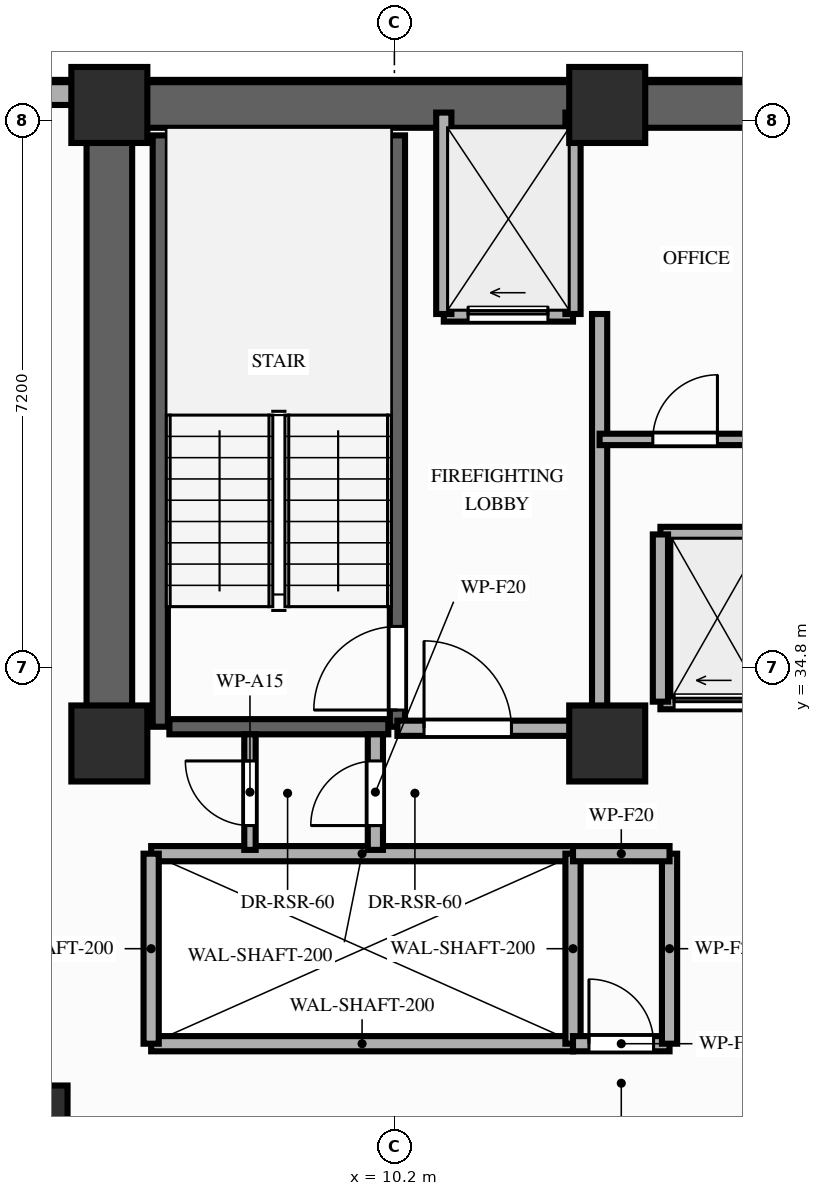
"""IFC4 building model, lengths in metres.
Left out: names, types, materials, properties, quantities, classifications, styles, units other than length and angle.
Written with IfcOpenShell. Run it as: python <this file> out.ifc"""

import sys

from ifc_helpers import new_model, si_unit, direction, frame, frame_2d, origin, origin_2d, place, context, subcontext, project, spatial, rectangle, extrude, element, fill, save


model = new_model("IFC4")
c1 = context("Model", 3, precision=1e-05, world=origin(), true_north=direction((0.0, 1.0)))
c2 = subcontext(c1, "Body", "Model", "MODEL_VIEW")
j1 = project(units=[si_unit("LENGTHUNIT", "METRE"), si_unit("PLANEANGLEUNIT", "RADIAN")], contexts=[c1])
p1 = place(None, origin())
s1 = spatial("IfcSite", under=j1, at=p1, CompositionType="ELEMENT")
p2 = place(p1, origin())
s2 = spatial("IfcBuilding", under=s1, at=p2, CompositionType="ELEMENT")
p3 = place(p2, frame((0.0, 0.0, 142.6)))
s3 = spatial("IfcBuildingStorey", under=s2, at=p3, CompositionType="ELEMENT", Elevation=142.6)
for number, where, z_axis, x_axis in (
    (1, (6.45, 33.8, 0.0), (0.0, 0.0, 1.0), (1.0, 0.0, 0.0)),
    (2, (13.0, 33.8, 0.0), (0.0, 0.0, 1.0), (1.0, 0.0, 0.0)),
    (3, (6.45, 42.2, 0.0), (0.0, 0.0, 1.0), (1.0, 0.0, 0.0)),
    (4, (13.0, 42.2, 0.0), (0.0, 0.0, 1.0), (1.0, 0.0, 0.0)),
    (5, (5.4, 28.8, 0.0), (0.0, 0.0, 1.0), (1.0, 0.0, 0.0)),
):
    element("IfcColumn", number, at=place(p3, frame(where, z_axis=z_axis, x_axis=x_axis)), inside=s3, PredefinedType="COLUMN", context=c2, shape_type="SweptSolid", body=[
        extrude(rectangle(XDim=1.0, YDim=1.0, at=origin_2d()), origin(), (0.0, 0.0, 1.0), 3.2),
    ])
p4 = place(p3, frame((6.0, 42.35, 0.0), z_axis=(0.0, 0.0, 1.0), x_axis=(-1.0, 0.0, 0.0)))
e6 = element("IfcWall", 6, at=p4, inside=s3, PredefinedType="STANDARD", context=c2, shape_type="SweptSolid", body=[
    extrude(rectangle(XDim=2.0, YDim=0.3, at=frame_2d((1.0, 0.0))), origin(), (0.0, 0.0, 1.0), 3.02),
])
p5 = place(p3, frame((6.45, 42.2, 0.0), z_axis=(0.0, 0.0, 1.0), x_axis=(1.0, 0.0, 0.0)))
e7 = element("IfcWall", 7, at=p5, inside=s3, PredefinedType="SHEAR", context=c2, shape_type="SweptSolid", body=[
    extrude(rectangle(XDim=20.45, YDim=0.6, at=frame_2d((10.225, 0.0))), origin(), (0.0, 0.0, 1.0), 3.02),
])
p6 = place(p3, frame((6.45, 33.8, 0.0), z_axis=(0.0, 0.0, 1.0), x_axis=(0.0, 1.0, 0.0)))
e8 = element("IfcWall", 8, at=p6, inside=s3, PredefinedType="SHEAR", context=c2, shape_type="SweptSolid", body=[
    extrude(rectangle(XDim=7.95, YDim=0.6, at=frame_2d((3.975, 0.0))), origin(), (0.0, 0.0, 1.0), 3.02),
])
p7 = place(p3, frame((7.12, 34.02, 0.0), z_axis=(0.0, 0.0, 1.0), x_axis=(0.0, 1.0, 0.0)))
e9 = element("IfcWall", 9, at=p7, inside=s3, PredefinedType="SHEAR", context=c2, shape_type="SweptSolid", body=[
    extrude(rectangle(XDim=7.78, YDim=0.2, at=frame_2d((3.89, 0.0))), origin(), (0.0, 0.0, 1.0), 3.02),
])
p8 = place(p3, frame((10.24, 34.02, 0.0), z_axis=(0.0, 0.0, 1.0), x_axis=(0.0, 1.0, 0.0)))
e10 = element("IfcWall", 10, at=p8, inside=s3, PredefinedType="SHEAR", context=c2, shape_type="SweptSolid", body=[
    extrude(rectangle(XDim=7.78, YDim=0.2, at=frame_2d((3.89, 0.0))), origin(), (0.0, 0.0, 1.0), 3.02),
])
p9 = place(p8, frame((0.22, 0.0, 0.0)))
e11 = element("IfcOpeningElement", 11, at=p9, cuts=e10, PredefinedType="OPENING", context=c2, shape_type="SweptSolid", body=[
    extrude(rectangle(XDim=1.1, YDim=2.15, at=frame_2d((0.55, 1.075))), frame((0.0, 0.11, 0.0), z_axis=(0.0, -1.0, 0.0), x_axis=(1.0, 0.0, 0.0)), (0.0, 0.0, 1.0), 0.22),
])
p10 = place(p3, frame((7.24, 34.02, 0.0), z_axis=(0.0, 0.0, 1.0), x_axis=(1.0, 0.0, 0.0)))
e12 = element("IfcWall", 12, at=p10, inside=s3, PredefinedType="SHEAR", context=c2, shape_type="SweptSolid", body=[
    extrude(rectangle(XDim=2.88, YDim=0.2, at=frame_2d((1.44, 0.0))), origin(), (0.0, 0.0, 1.0), 3.02),
])
for number, where, z_axis, x_axis in (
    (13, (7.0, 29.85, 0.0), (0.0, 0.0, 1.0), (1.0, 0.0, 0.0)),
    (14, (7.0, 32.35, 0.0), (0.0, 0.0, 1.0), (1.0, 0.0, 0.0)),
):
    element("IfcWall", number, at=place(p3, frame(where, z_axis=z_axis, x_axis=x_axis)), inside=s3, PredefinedType="MOVABLE", context=c2, shape_type="SweptSolid", body=[
        extrude(rectangle(XDim=5.55, YDim=0.2, at=frame_2d((2.775, 0.0))), origin(), (0.0, 0.0, 1.0), 3.02),
    ])
for number, where, z_axis, x_axis in (
    (15, (7.0, 29.85, 0.0), (0.0, 0.0, 1.0), (0.0, 1.0, 0.0)),
    (16, (12.55, 29.85, 0.0), (0.0, 0.0, 1.0), (0.0, 1.0, 0.0)),
):
    element("IfcWall", number, at=place(p3, frame(where, z_axis=z_axis, x_axis=x_axis)), inside=s3, PredefinedType="MOVABLE", context=c2, shape_type="SweptSolid", body=[
        extrude(rectangle(XDim=2.5, YDim=0.2, at=frame_2d((1.25, 0.0))), origin(), (0.0, 0.0, 1.0), 3.02),
    ])
p11 = place(p3, frame((10.85, 39.45, 0.0), z_axis=(0.0, 0.0, 1.0), x_axis=(1.0, 0.0, 0.0)))
e17 = element("IfcWall", 17, at=p11, inside=s3, PredefinedType="MOVABLE", context=c2, shape_type="SweptSolid", body=[
    extrude(rectangle(XDim=1.7, YDim=0.2, at=frame_2d((0.85, 0.0))), origin(), (0.0, 0.0, 1.0), 3.02),
])
p12 = place(p11, frame((0.32, 0.0, 0.0)))
e18 = element("IfcOpeningElement", 18, at=p12, cuts=e17, PredefinedType="OPENING", context=c2, shape_type="SweptSolid", body=[
    extrude(rectangle(XDim=1.05, YDim=2.15, at=frame_2d((0.525, 1.075))), frame((0.0, 0.11, 0.0), z_axis=(0.0, -1.0, 0.0), x_axis=(1.0, 0.0, 0.0)), (0.0, 0.0, 1.0), 0.22),
])
for number, where, z_axis, x_axis in (
    (19, (10.85, 39.45, 0.0), (0.0, 0.0, 1.0), (0.0, 1.0, 0.0)),
    (20, (12.55, 39.45, 0.0), (0.0, 0.0, 1.0), (0.0, 1.0, 0.0)),
):
    element("IfcWall", number, at=place(p3, frame(where, z_axis=z_axis, x_axis=x_axis)), inside=s3, PredefinedType="MOVABLE", context=c2, shape_type="SweptSolid", body=[
        extrude(rectangle(XDim=2.65, YDim=0.2, at=frame_2d((1.325, 0.0))), origin(), (0.0, 0.0, 1.0), 2.45),
    ])
p13 = place(p3, frame((12.9, 34.0, 0.0), z_axis=(0.0, 0.0, 1.0), x_axis=(0.0, 1.0, 0.0)))
e21 = element("IfcWall", 21, at=p13, inside=s3, PredefinedType="PARTITIONING", context=c2, shape_type="SweptSolid", body=[
    extrude(rectangle(XDim=5.45, YDim=0.2, at=frame_2d((2.725, 0.0))), origin(), (0.0, 0.0, 1.0), 2.45),
])
p14 = place(p3, frame((10.24, 34.0, 0.0), z_axis=(0.0, 0.0, 1.0), x_axis=(1.0, 0.0, 0.0)))
e22 = element("IfcWall", 22, at=p14, inside=s3, PredefinedType="PARTITIONING", context=c2, shape_type="SweptSolid", body=[
    extrude(rectangle(XDim=2.66, YDim=0.2, at=frame_2d((1.33, 0.0))), origin(), (0.0, 0.0, 1.0), 2.45),
])
p15 = place(p14, frame((0.35, 0.0, 0.0)))
e23 = element("IfcOpeningElement", 23, at=p15, cuts=e22, PredefinedType="OPENING", context=c2, shape_type="SweptSolid", body=[
    extrude(rectangle(XDim=1.15, YDim=2.15, at=frame_2d((0.575, 1.075))), frame((0.0, 0.11, 0.0), z_axis=(0.0, -1.0, 0.0), x_axis=(1.0, 0.0, 0.0)), (0.0, 0.0, 1.0), 0.22),
])
p16 = place(p3, frame((9.95, 32.4, 0.0), z_axis=(0.0, 0.0, 1.0), x_axis=(0.0, 1.0, 0.0)))
e24 = element("IfcWall", 24, at=p16, inside=s3, PredefinedType="PARTITIONING", context=c2, shape_type="SweptSolid", body=[
    extrude(rectangle(XDim=1.52, YDim=0.2, at=frame_2d((0.76, 0.0))), origin(), (0.0, 0.0, 1.0), 2.45),
])
p17 = place(p16, frame((0.32, 0.0, 0.0)))
e25 = element("IfcOpeningElement", 25, at=p17, cuts=e24, PredefinedType="OPENING", context=c2, shape_type="SweptSolid", body=[
    extrude(rectangle(XDim=0.85, YDim=2.05, at=frame_2d((0.425, 1.025))), frame((0.0, 0.11, 0.0), z_axis=(0.0, -1.0, 0.0), x_axis=(1.0, 0.0, 0.0)), (0.0, 0.0, 1.0), 0.22),
])
p18 = place(p3, frame((8.3, 32.4, 0.0), z_axis=(0.0, 0.0, 1.0), x_axis=(0.0, 1.0, 0.0)))
e26 = element("IfcWall", 26, at=p18, inside=s3, PredefinedType="PARTITIONING", context=c2, shape_type="SweptSolid", body=[
    extrude(rectangle(XDim=1.52, YDim=0.15, at=frame_2d((0.76, 0.0))), origin(), (0.0, 0.0, 1.0), 2.45),
])
p19 = place(p18, frame((0.32, 0.0, 0.0)))
e27 = element("IfcOpeningElement", 27, at=p19, cuts=e26, PredefinedType="OPENING", context=c2, shape_type="SweptSolid", body=[
    extrude(rectangle(XDim=0.85, YDim=2.05, at=frame_2d((0.425, 1.025))), frame((0.0, 0.085, 0.0), z_axis=(0.0, -1.0, 0.0), x_axis=(1.0, 0.0, 0.0)), (0.0, 0.0, 1.0), 0.17),
])
p20 = place(p3, frame((12.55, 29.85, 0.0), z_axis=(0.0, 0.0, 1.0), x_axis=(1.0, 0.0, 0.0)))
e28 = element("IfcWall", 28, at=p20, inside=s3, PredefinedType="PARTITIONING", context=c2, shape_type="SweptSolid", body=[
    extrude(rectangle(XDim=1.27, YDim=0.2, at=frame_2d((0.635, 0.0))), origin(), (0.0, 0.0, 1.0), 3.02),
])
p21 = place(p20, frame((0.21, 0.0, 0.0)))
e29 = element("IfcOpeningElement", 29, at=p21, cuts=e28, PredefinedType="OPENING", context=c2, shape_type="SweptSolid", body=[
    extrude(rectangle(XDim=0.85, YDim=2.05, at=frame_2d((0.425, 1.025))), frame((0.0, 0.11, 0.0), z_axis=(0.0, -1.0, 0.0), x_axis=(1.0, 0.0, 0.0)), (0.0, 0.0, 1.0), 0.22),
])
p22 = place(p3, frame((13.82, 29.85, 0.0), z_axis=(0.0, 0.0, 1.0), x_axis=(0.0, 1.0, 0.0)))
e30 = element("IfcWall", 30, at=p22, inside=s3, PredefinedType="PARTITIONING", context=c2, shape_type="SweptSolid", body=[
    extrude(rectangle(XDim=2.5, YDim=0.2, at=frame_2d((1.25, 0.0))), origin(), (0.0, 0.0, 1.0), 3.02),
])
p23 = place(p3, frame((12.55, 32.35, 0.0), z_axis=(0.0, 0.0, 1.0), x_axis=(1.0, 0.0, 0.0)))
e31 = element("IfcWall", 31, at=p23, inside=s3, PredefinedType="PARTITIONING", context=c2, shape_type="SweptSolid", body=[
    extrude(rectangle(XDim=1.27, YDim=0.2, at=frame_2d((0.635, 0.0))), origin(), (0.0, 0.0, 1.0), 3.02),
])
p24 = place(p3, frame((12.9, 37.8, 0.0), z_axis=(0.0, 0.0, 1.0), x_axis=(1.0, 0.0, 0.0)))
e32 = element("IfcWall", 32, at=p24, inside=s3, PredefinedType="PARTITIONING", context=c2, shape_type="SweptSolid", body=[
    extrude(rectangle(XDim=7.6, YDim=0.15, at=frame_2d((3.8, 0.0))), origin(), (0.0, 0.0, 1.0), 3.02),
])
p25 = place(p24, frame((0.7, 0.0, 0.0)))
e33 = element("IfcOpeningElement", 33, at=p25, cuts=e32, PredefinedType="OPENING", context=c2, shape_type="SweptSolid", body=[
    extrude(rectangle(XDim=0.85, YDim=2.05, at=frame_2d((0.425, 1.025))), frame((0.0, 0.085, 0.0), z_axis=(0.0, -1.0, 0.0), x_axis=(1.0, 0.0, 0.0)), (0.0, 0.0, 1.0), 0.17),
])
p26 = place(p24, frame((3.25, 0.0, 0.0)))
e34 = element("IfcOpeningElement", 34, at=p26, cuts=e32, PredefinedType="OPENING", context=c2, shape_type="SweptSolid", body=[
    extrude(rectangle(XDim=0.85, YDim=2.05, at=frame_2d((0.425, 1.025))), frame((0.0, 0.085, 0.0), z_axis=(0.0, -1.0, 0.0), x_axis=(1.0, 0.0, 0.0)), (0.0, 0.0, 1.0), 0.17),
])
p27 = place(p24, frame((5.8, 0.0, 0.0)))
e35 = element("IfcOpeningElement", 35, at=p27, cuts=e32, PredefinedType="OPENING", context=c2, shape_type="SweptSolid", body=[
    extrude(rectangle(XDim=0.85, YDim=2.05, at=frame_2d((0.425, 1.025))), frame((0.0, 0.085, 0.0), z_axis=(0.0, -1.0, 0.0), x_axis=(1.0, 0.0, 0.0)), (0.0, 0.0, 1.0), 0.17),
])
p28 = place(p3, frame((13.7, 34.35, 0.0), z_axis=(0.0, 0.0, 1.0), x_axis=(1.0, 0.0, 0.0)))
e36 = element("IfcWall", 36, at=p28, inside=s3, PredefinedType="MOVABLE", context=c2, shape_type="SweptSolid", body=[
    extrude(rectangle(XDim=5.42, YDim=0.2, at=frame_2d((2.71, 0.0))), origin(), (0.0, 0.0, 1.0), 3.02),
])
p29 = place(p28, frame((0.18, 0.0, 0.0)))
e37 = element("IfcOpeningElement", 37, at=p29, cuts=e36, PredefinedType="OPENING", context=c2, shape_type="SweptSolid", body=[
    extrude(rectangle(XDim=1.05, YDim=2.15, at=frame_2d((0.525, 1.075))), frame((0.0, 0.11, 0.0), z_axis=(0.0, -1.0, 0.0), x_axis=(1.0, 0.0, 0.0)), (0.0, 0.0, 1.0), 0.22),
])
p30 = place(p28, frame((1.47, 0.0, 0.0)))
e38 = element("IfcOpeningElement", 38, at=p30, cuts=e36, PredefinedType="OPENING", context=c2, shape_type="SweptSolid", body=[
    extrude(rectangle(XDim=1.05, YDim=2.15, at=frame_2d((0.525, 1.075))), frame((0.0, 0.11, 0.0), z_axis=(0.0, -1.0, 0.0), x_axis=(1.0, 0.0, 0.0)), (0.0, 0.0, 1.0), 0.22),
])
p31 = place(p28, frame((2.78, 0.0, 0.0)))
e39 = element("IfcOpeningElement", 39, at=p31, cuts=e36, PredefinedType="OPENING", context=c2, shape_type="SweptSolid", body=[
    extrude(rectangle(XDim=1.05, YDim=2.15, at=frame_2d((0.525, 1.075))), frame((0.0, 0.11, 0.0), z_axis=(0.0, -1.0, 0.0), x_axis=(1.0, 0.0, 0.0)), (0.0, 0.0, 1.0), 0.22),
])
p32 = place(p28, frame((4.08, 0.0, 0.0)))
e40 = element("IfcOpeningElement", 40, at=p32, cuts=e36, PredefinedType="OPENING", context=c2, shape_type="SweptSolid", body=[
    extrude(rectangle(XDim=1.05, YDim=2.15, at=frame_2d((0.525, 1.075))), frame((0.0, 0.11, 0.0), z_axis=(0.0, -1.0, 0.0), x_axis=(1.0, 0.0, 0.0)), (0.0, 0.0, 1.0), 0.22),
])
p33 = place(p3, frame((13.7, 36.55, 0.0), z_axis=(0.0, 0.0, 1.0), x_axis=(1.0, 0.0, 0.0)))
e41 = element("IfcWall", 41, at=p33, inside=s3, PredefinedType="MOVABLE", context=c2, shape_type="SweptSolid", body=[
    extrude(rectangle(XDim=5.42, YDim=0.2, at=frame_2d((2.71, 0.0))), origin(), (0.0, 0.0, 1.0), 3.02),
])
p34 = place(p3, frame((13.7, 34.35, 0.0), z_axis=(0.0, 0.0, 1.0), x_axis=(0.0, 1.0, 0.0)))
e42 = element("IfcWall", 42, at=p34, inside=s3, PredefinedType="MOVABLE", context=c2, shape_type="SweptSolid", body=[
    extrude(rectangle(XDim=2.2, YDim=0.2, at=frame_2d((1.1, 0.0))), origin(), (0.0, 0.0, 1.0), 3.02),
])
p35 = place(p9, origin())
e43 = element("IfcDoor", 43, at=p35, inside=s3, OperationType="SINGLE_SWING_LEFT", PredefinedType="DOOR", context=c2, shape_type="SweptSolid", body=[
    extrude(rectangle(XDim=1.1, YDim=2.15, at=frame_2d((0.55, 1.075))), frame((0.0, 0.025, 0.0), z_axis=(0.0, -1.0, 0.0), x_axis=(1.0, 0.0, 0.0)), (0.0, 0.0, 1.0), 0.05),
])
fill(e11, e43)
p36 = place(p12, origin())
e44 = element("IfcDoor", 44, at=p36, inside=s3, OperationType="SLIDING_TO_LEFT", PredefinedType="DOOR", context=c2, shape_type="SweptSolid", body=[
    extrude(rectangle(XDim=1.05, YDim=2.15, at=frame_2d((0.525, 1.075))), frame((0.0, 0.025, 0.0), z_axis=(0.0, -1.0, 0.0), x_axis=(1.0, 0.0, 0.0)), (0.0, 0.0, 1.0), 0.05),
])
fill(e18, e44)
p37 = place(p15, origin())
e45 = element("IfcDoor", 45, at=p37, inside=s3, OperationType="SINGLE_SWING_LEFT", PredefinedType="DOOR", context=c2, shape_type="SweptSolid", body=[
    extrude(rectangle(XDim=1.15, YDim=2.15, at=frame_2d((0.575, 1.075))), frame((0.0, 0.025, 0.0), z_axis=(0.0, -1.0, 0.0), x_axis=(1.0, 0.0, 0.0)), (0.0, 0.0, 1.0), 0.05),
])
fill(e23, e45)
p38 = place(p17, origin())
e46 = element("IfcDoor", 46, at=p38, inside=s3, OperationType="SINGLE_SWING_LEFT", PredefinedType="DOOR", context=c2, shape_type="SweptSolid", body=[
    extrude(rectangle(XDim=0.85, YDim=2.05, at=frame_2d((0.425, 1.025))), frame((0.0, 0.025, 0.0), z_axis=(0.0, -1.0, 0.0), x_axis=(1.0, 0.0, 0.0)), (0.0, 0.0, 1.0), 0.05),
])
fill(e25, e46)
p39 = place(p19, origin())
e47 = element("IfcDoor", 47, at=p39, inside=s3, OperationType="SINGLE_SWING_RIGHT", PredefinedType="DOOR", context=c2, shape_type="SweptSolid", body=[
    extrude(rectangle(XDim=0.85, YDim=2.05, at=frame_2d((0.425, 1.025))), frame((0.0, 0.025, 0.0), z_axis=(0.0, -1.0, 0.0), x_axis=(1.0, 0.0, 0.0)), (0.0, 0.0, 1.0), 0.05),
])
fill(e27, e47)
p40 = place(p21, origin())
e48 = element("IfcDoor", 48, at=p40, inside=s3, OperationType="SINGLE_SWING_LEFT", PredefinedType="DOOR", context=c2, shape_type="SweptSolid", body=[
    extrude(rectangle(XDim=0.85, YDim=2.05, at=frame_2d((0.425, 1.025))), frame((0.0, 0.025, 0.0), z_axis=(0.0, -1.0, 0.0), x_axis=(1.0, 0.0, 0.0)), (0.0, 0.0, 1.0), 0.05),
])
fill(e29, e48)
p41 = place(p25, origin())
e49 = element("IfcDoor", 49, at=p41, inside=s3, OperationType="SINGLE_SWING_RIGHT", PredefinedType="DOOR", context=c2, shape_type="SweptSolid", body=[
    extrude(rectangle(XDim=0.85, YDim=2.05, at=frame_2d((0.425, 1.025))), frame((0.0, 0.025, 0.0), z_axis=(0.0, -1.0, 0.0), x_axis=(1.0, 0.0, 0.0)), (0.0, 0.0, 1.0), 0.05),
])
fill(e33, e49)
p42 = place(p29, origin())
e50 = element("IfcDoor", 50, at=p42, inside=s3, OperationType="SLIDING_TO_LEFT", PredefinedType="DOOR", context=c2, shape_type="SweptSolid", body=[
    extrude(rectangle(XDim=1.05, YDim=2.15, at=frame_2d((0.525, 1.075))), frame((0.0, 0.025, 0.0), z_axis=(0.0, -1.0, 0.0), x_axis=(1.0, 0.0, 0.0)), (0.0, 0.0, 1.0), 0.05),
])
fill(e37, e50)
save(model, sys.argv[1])
